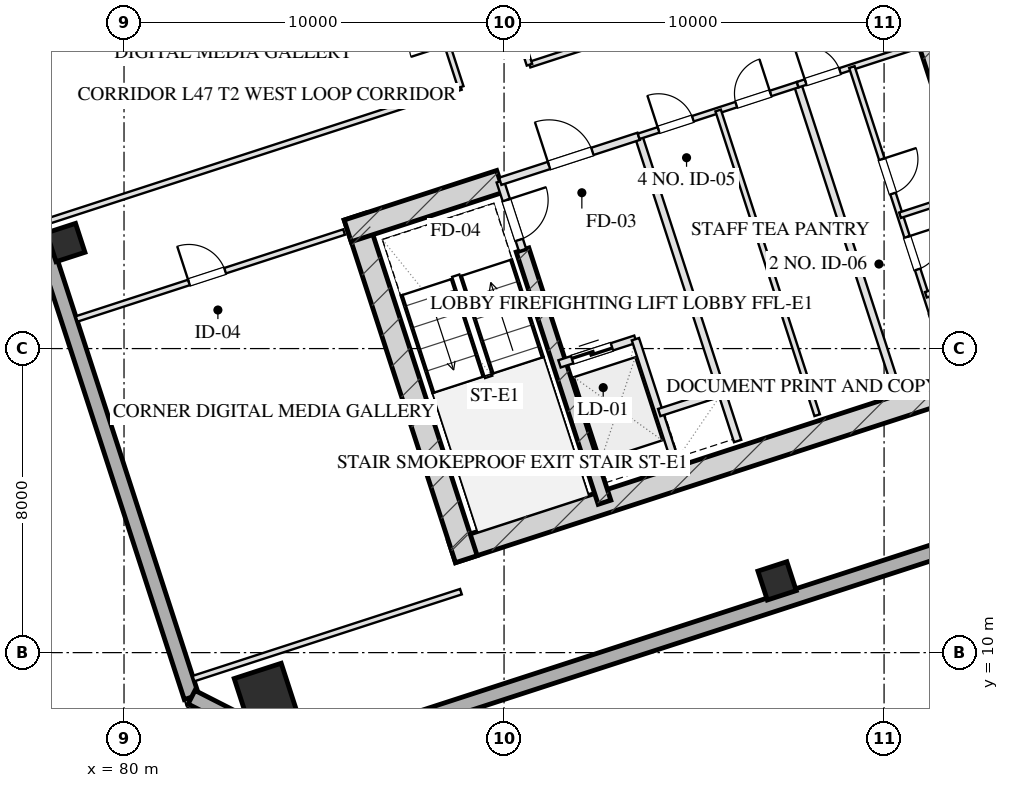
"""IFC4 building model, lengths in metres.
Left out: names, types, materials, properties, quantities, classifications, styles, units other than length and angle.
Written with IfcOpenShell. Run it as: python <this file> out.ifc"""

import sys

from ifc_helpers import new_model, si_unit, direction, frame, frame_2d, origin, origin_2d, place, context, subcontext, project, spatial, rectangle, hollow_rectangle, extrude, element, fill, save


model = new_model("IFC4")
c1 = context("Model", 3, precision=1e-05, world=origin(), true_north=direction((0.0, 1.0)))
c2 = subcontext(c1, "Body", "Model", "MODEL_VIEW")
j1 = project(units=[si_unit("LENGTHUNIT", "METRE"), si_unit("PLANEANGLEUNIT", "RADIAN")], contexts=[c1])
p1 = place(None, origin())
s1 = spatial("IfcSite", under=j1, at=p1, CompositionType="ELEMENT")
p2 = place(p1, origin())
s2 = spatial("IfcBuilding", under=s1, at=p2, CompositionType="ELEMENT")
p3 = place(p2, frame((0.0, 0.0, 177.1)))
s3 = spatial("IfcBuildingStorey", under=s2, at=p3, CompositionType="ELEMENT", Elevation=177.1)
p4 = place(p3, frame((88.63, 12.652, 0.0), z_axis=(0.0, 0.0, 1.0), x_axis=(0.95105714907, 0.309015046886, 0.0)))
e1 = element("IfcWall", 1, at=p4, inside=s3, PredefinedType="SHEAR", context=c2, shape_type="SweptSolid", body=[
    extrude(rectangle(XDim=16.4, YDim=0.6, at=frame_2d((8.2, 0.0))), origin(), (0.0, 0.0, 1.0), 3.45),
])
p5 = place(p3, frame((86.078, 21.475, 0.0), z_axis=(0.0, 0.0, 1.0), x_axis=(0.309017938678, -0.951056209472, 0.0)))
e2 = element("IfcWall", 2, at=p5, inside=s3, PredefinedType="SHEAR", context=c2, shape_type="SweptSolid", body=[
    extrude(rectangle(XDim=9.48, YDim=0.6, at=frame_2d((4.74, 0.0))), origin(), (0.0, 0.0, 1.0), 3.45),
])
p6 = place(p3, frame((101.105, 26.358, 0.0), z_axis=(0.0, 0.0, 1.0), x_axis=(0.309010370028, -0.95105866865, 0.0)))
e3 = element("IfcWall", 3, at=p6, inside=s3, PredefinedType="SHEAR", context=c2, shape_type="SweptSolid", body=[
    extrude(rectangle(XDim=9.48, YDim=0.6, at=frame_2d((4.74, 0.0))), origin(), (0.0, 0.0, 1.0), 3.45),
])
p7 = place(p3, frame((90.486, 20.594, 0.0), z_axis=(0.0, 0.0, 1.0), x_axis=(0.309020428229, -0.951055400562, 0.0)))
e4 = element("IfcWall", 4, at=p7, inside=s3, PredefinedType="SHEAR", context=c2, shape_type="SweptSolid", body=[
    extrude(rectangle(XDim=6.98, YDim=0.35, at=frame_2d((3.49, 0.0))), origin(), (0.0, 0.0, 1.0), 3.45),
])
p8 = place(p3, frame((85.886, 21.097, 0.0), z_axis=(0.0, 0.0, 1.0), x_axis=(0.951068073652, 0.308981422225, 0.0)))
e5 = element("IfcWall", 5, at=p8, inside=s3, PredefinedType="SHEAR", context=c2, shape_type="SweptSolid", body=[
    extrude(rectangle(XDim=4.22, YDim=0.6, at=frame_2d((2.11, 0.0))), origin(), (0.0, 0.0, 1.0), 3.45),
])
p9 = place(p3, frame((83.719, 8.901, 0.0), z_axis=(0.0, 0.0, 1.0), x_axis=(0.951056516295, 0.309016994375, 0.0)))
e6 = element("IfcColumn", 6, at=p9, inside=s3, PredefinedType="COLUMN", context=c2, shape_type="SweptSolid", body=[
    extrude(hollow_rectangle(XDim=1.3, YDim=1.3, WallThickness=0.045, at=origin_2d()), origin(), (0.0, 0.0, 1.0), 3.451),
])
for number, where, z_axis, x_axis in (
    (7, (78.468, 20.79, 0.0), (0.0, 0.0, 1.0), (0.951, 0.309, 0.0)),
    (8, (97.185, 11.888, 0.0), (0.0, 0.0, 1.0), (0.951, 0.309, 0.0)),
):
    element("IfcColumn", number, at=place(p3, frame(where, z_axis=z_axis, x_axis=x_axis)), inside=s3, PredefinedType="COLUMN", context=c2, shape_type="SweptSolid", body=[
        extrude(hollow_rectangle(XDim=0.8, YDim=0.8, WallThickness=0.028, at=origin_2d()), origin(), (0.0, 0.0, 1.0), 3.451),
    ])
p10 = place(p3, frame((81.776, 8.827, 0.0), z_axis=(0.0, 0.0, 1.0), x_axis=(-0.309014228706, 0.951057414911, 0.0)))
e9 = element("IfcWall", 9, at=p10, inside=s3, PredefinedType="SOLIDWALL", context=c2, shape_type="SweptSolid", body=[
    extrude(rectangle(XDim=42.8, YDim=0.4, at=frame_2d((21.4, 0.0))), origin(), (0.0, 0.0, 1.0), 2.61),
])
p11 = place(p10, frame((13.95, 0.0, 0.75)))
e10 = element("IfcOpeningElement", 10, at=p11, cuts=e9, PredefinedType="OPENING", context=c2, shape_type="SweptSolid", body=[
    extrude(rectangle(XDim=2.1, YDim=1.46, at=frame_2d((1.05, 0.73))), frame((0.0, 0.21, 0.0), z_axis=(0.0, -1.0, 0.0), x_axis=(1.0, 0.0, 0.0)), (0.0, 0.0, 1.0), 0.42),
])
p12 = place(p10, frame((17.75, 0.0, 0.75)))
e11 = element("IfcOpeningElement", 11, at=p12, cuts=e9, PredefinedType="OPENING", context=c2, shape_type="SweptSolid", body=[
    extrude(rectangle(XDim=2.1, YDim=1.46, at=frame_2d((1.05, 0.73))), frame((0.0, 0.21, 0.0), z_axis=(0.0, -1.0, 0.0), x_axis=(1.0, 0.0, 0.0)), (0.0, 0.0, 1.0), 0.42),
])
p13 = place(p10, frame((23.95, 0.0, 0.0)))
e12 = element("IfcOpeningElement", 12, at=p13, cuts=e9, PredefinedType="OPENING", context=c2, shape_type="SweptSolid", body=[
    extrude(rectangle(XDim=1.1, YDim=2.15, at=frame_2d((0.55, 1.075))), frame((0.0, 0.21, 0.0), z_axis=(0.0, -1.0, 0.0), x_axis=(1.0, 0.0, 0.0)), (0.0, 0.0, 1.0), 0.42),
])
p14 = place(p3, frame((98.224, 59.173, 0.0), z_axis=(0.0, 0.0, 1.0), x_axis=(0.309014228706, -0.951057414911, 0.0)))
e13 = element("IfcWall", 13, at=p14, inside=s3, PredefinedType="SOLIDWALL", context=c2, shape_type="SweptSolid", body=[
    extrude(rectangle(XDim=42.8, YDim=0.4, at=frame_2d((21.4, 0.0))), origin(), (0.0, 0.0, 1.0), 2.61),
])
p15 = place(p14, frame((26.75, 0.0, 0.75)))
e14 = element("IfcOpeningElement", 14, at=p15, cuts=e13, PredefinedType="OPENING", context=c2, shape_type="SweptSolid", body=[
    extrude(rectangle(XDim=2.1, YDim=1.46, at=frame_2d((1.05, 0.73))), frame((0.0, 0.21, 0.0), z_axis=(0.0, -1.0, 0.0), x_axis=(1.0, 0.0, 0.0)), (0.0, 0.0, 1.0), 0.42),
])
p16 = place(p14, frame((22.95, 0.0, 0.75)))
e15 = element("IfcOpeningElement", 15, at=p16, cuts=e13, PredefinedType="OPENING", context=c2, shape_type="SweptSolid", body=[
    extrude(rectangle(XDim=2.1, YDim=1.46, at=frame_2d((1.05, 0.73))), frame((0.0, 0.21, 0.0), z_axis=(0.0, -1.0, 0.0), x_axis=(1.0, 0.0, 0.0)), (0.0, 0.0, 1.0), 0.42),
])
p17 = place(p14, frame((16.45, 0.0, 0.0)))
e16 = element("IfcOpeningElement", 16, at=p17, cuts=e13, PredefinedType="OPENING", context=c2, shape_type="SweptSolid", body=[
    extrude(rectangle(XDim=1.1, YDim=2.15, at=frame_2d((0.55, 1.075))), frame((0.0, 0.21, 0.0), z_axis=(0.0, -1.0, 0.0), x_axis=(1.0, 0.0, 0.0)), (0.0, 0.0, 1.0), 0.42),
])
p18 = place(p3, frame((109.908, 15.444, 0.0), z_axis=(0.0, 0.0, 1.0), x_axis=(-0.951057580055, -0.30901372044, 0.0)))
e17 = element("IfcWall", 17, at=p18, inside=s3, PredefinedType="SOLIDWALL", context=c2, shape_type="SweptSolid", body=[
    extrude(rectangle(XDim=26.4, YDim=0.4, at=frame_2d((13.2, 0.0))), origin(), (0.0, 0.0, 1.0), 2.61),
])
p19 = place(p3, frame((84.801, 7.286, 0.0), z_axis=(0.0, 0.0, 1.0), x_axis=(-0.891020832027, 0.453962417932, 0.0)))
e18 = element("IfcWall", 18, at=p19, inside=s3, PredefinedType="SOLIDWALL", context=c2, shape_type="SweptSolid", body=[
    extrude(rectangle(XDim=3.394, YDim=0.4, at=frame_2d((1.697, 0.0))), origin(), (0.0, 0.0, 1.0), 2.61),
])
p20 = place(p3, frame((89.899, 22.401, 0.0), z_axis=(0.0, 0.0, 1.0), x_axis=(0.308932062672, -0.951084108086, 0.0)))
e19 = element("IfcWall", 19, at=p20, inside=s3, PredefinedType="PARTITIONING", context=c2, shape_type="SweptSolid", body=[
    extrude(rectangle(XDim=1.9, YDim=0.2, at=frame_2d((0.95, 0.0))), origin(), (0.0, 0.0, 1.0), 3.175),
])
p21 = place(p20, frame((0.52, 0.0, 0.0)))
e20 = element("IfcOpeningElement", 20, at=p21, cuts=e19, PredefinedType="OPENING", context=c2, shape_type="SweptSolid", body=[
    extrude(rectangle(XDim=1.1, YDim=2.05, at=frame_2d((0.55, 1.025))), frame((0.0, 0.11, 0.0), z_axis=(0.0, -1.0, 0.0), x_axis=(1.0, 0.0, 0.0)), (0.0, 0.0, 1.0), 0.22),
])
p22 = place(p3, frame((93.542, 23.585, 0.0), z_axis=(0.0, 0.0, 1.0), x_axis=(0.309042196757, -0.951048327176, 0.0)))
e21 = element("IfcWall", 21, at=p22, inside=s3, PredefinedType="PARTITIONING", context=c2, shape_type="SweptSolid", body=[
    extrude(rectangle(XDim=8.43, YDim=0.2, at=frame_2d((4.215, 0.0))), origin(), (0.0, 0.0, 1.0), 3.175),
])
p23 = place(p3, frame((89.899, 22.401, 0.0), z_axis=(0.0, 0.0, 1.0), x_axis=(0.951046716504, 0.309047153403, 0.0)))
e22 = element("IfcWall", 22, at=p23, inside=s3, PredefinedType="PARTITIONING", context=c2, shape_type="SweptSolid", body=[
    extrude(rectangle(XDim=3.83, YDim=0.2, at=frame_2d((1.915, 0.0))), origin(), (0.0, 0.0, 1.0), 3.175),
])
p24 = place(p23, frame((1.35, 0.0, 0.0)))
e23 = element("IfcOpeningElement", 23, at=p24, cuts=e22, PredefinedType="OPENING", context=c2, shape_type="SweptSolid", body=[
    extrude(rectangle(XDim=1.2, YDim=2.05, at=frame_2d((0.6, 1.025))), frame((0.0, 0.11, 0.0), z_axis=(0.0, -1.0, 0.0), x_axis=(1.0, 0.0, 0.0)), (0.0, 0.0, 1.0), 0.22),
])
p25 = place(p3, frame((91.46, 17.598, 0.0), z_axis=(0.0, 0.0, 1.0), x_axis=(0.951062257173, 0.308999325213, 0.0)))
e24 = element("IfcWall", 24, at=p25, inside=s3, PredefinedType="PARTITIONING", context=c2, shape_type="SweptSolid", body=[
    extrude(rectangle(XDim=2.1, YDim=0.2, at=frame_2d((1.05, 0.0))), origin(), (0.0, 0.0, 1.0), 3.175),
])
p26 = place(p25, frame((0.35, 0.0, 0.0)))
e25 = element("IfcOpeningElement", 25, at=p26, cuts=e24, PredefinedType="OPENING", context=c2, shape_type="SweptSolid", body=[
    extrude(rectangle(XDim=1.1, YDim=2.05, at=frame_2d((0.55, 1.025))), frame((0.0, 0.11, 0.0), z_axis=(0.0, -1.0, 0.0), x_axis=(1.0, 0.0, 0.0)), (0.0, 0.0, 1.0), 0.22),
])
p27 = place(p3, frame((93.457, 18.247, 0.0), z_axis=(0.0, 0.0, 1.0), x_axis=(0.3089935693, -0.951064127245, 0.0)))
e26 = element("IfcWall", 26, at=p27, inside=s3, PredefinedType="PARTITIONING", context=c2, shape_type="SweptSolid", body=[
    extrude(rectangle(XDim=3.7, YDim=0.2, at=frame_2d((1.85, 0.0))), origin(), (0.0, 0.0, 1.0), 3.175),
])
p28 = place(p3, frame((94.084, 16.317, 0.0), z_axis=(0.0, 0.0, 1.0), x_axis=(0.951041328149, 0.309063734775, 0.0)))
e27 = element("IfcWall", 27, at=p28, inside=s3, PredefinedType="PARTITIONING", context=c2, shape_type="SweptSolid", body=[
    extrude(rectangle(XDim=1.73, YDim=0.2, at=frame_2d((0.865, 0.0))), origin(), (0.0, 0.0, 1.0), 3.175),
])
p29 = place(p3, frame((97.727, 24.944, 0.0), z_axis=(0.0, 0.0, 1.0), x_axis=(0.309016001439, -0.951056838919, 0.0)))
e28 = element("IfcWall", 28, at=p29, inside=s3, PredefinedType="PARTITIONING", context=c2, shape_type="SweptSolid", body=[
    extrude(rectangle(XDim=8.43, YDim=0.2, at=frame_2d((4.215, 0.0))), origin(), (0.0, 0.0, 1.0), 3.175),
])
p30 = place(p3, frame((93.542, 23.585, 0.0), z_axis=(0.0, 0.0, 1.0), x_axis=(0.951063829732, 0.308994485023, 0.0)))
e29 = element("IfcWall", 29, at=p30, inside=s3, PredefinedType="PARTITIONING", context=c2, shape_type="SweptSolid", body=[
    extrude(rectangle(XDim=4.4, YDim=0.15, at=frame_2d((2.2, 0.0))), origin(), (0.0, 0.0, 1.0), 3.175),
])
p31 = place(p30, frame((0.55, 0.0, 0.0)))
e30 = element("IfcOpeningElement", 30, at=p31, cuts=e29, PredefinedType="OPENING", context=c2, shape_type="SweptSolid", body=[
    extrude(rectangle(XDim=0.95, YDim=2.05, at=frame_2d((0.475, 1.025))), frame((0.0, 0.085, 0.0), z_axis=(0.0, -1.0, 0.0), x_axis=(1.0, 0.0, 0.0)), (0.0, 0.0, 1.0), 0.17),
])
p32 = place(p30, frame((2.7, 0.0, 0.0)))
e31 = element("IfcOpeningElement", 31, at=p32, cuts=e29, PredefinedType="OPENING", context=c2, shape_type="SweptSolid", body=[
    extrude(rectangle(XDim=0.95, YDim=2.05, at=frame_2d((0.475, 1.025))), frame((0.0, 0.085, 0.0), z_axis=(0.0, -1.0, 0.0), x_axis=(1.0, 0.0, 0.0)), (0.0, 0.0, 1.0), 0.17),
])
p33 = place(p3, frame((95.634, 24.265, 0.0), z_axis=(0.0, 0.0, 1.0), x_axis=(0.309007490203, -0.951059604335, 0.0)))
e32 = element("IfcWall", 32, at=p33, inside=s3, PredefinedType="PARTITIONING", context=c2, shape_type="SweptSolid", body=[
    extrude(rectangle(XDim=8.43, YDim=0.15, at=frame_2d((4.215, 0.0))), origin(), (0.0, 0.0, 1.0), 3.175),
])
p34 = place(p3, frame((97.727, 24.944, 0.0), z_axis=(0.0, 0.0, 1.0), x_axis=(0.951036872128, 0.309077446369, 0.0)))
e33 = element("IfcWall", 33, at=p34, inside=s3, PredefinedType="PARTITIONING", context=c2, shape_type="SweptSolid", body=[
    extrude(rectangle(XDim=3.2, YDim=0.15, at=frame_2d((1.6, 0.0))), origin(), (0.0, 0.0, 1.0), 3.175),
])
p35 = place(p34, frame((0.22, 0.0, 0.0)))
e34 = element("IfcOpeningElement", 34, at=p35, cuts=e33, PredefinedType="OPENING", context=c2, shape_type="SweptSolid", body=[
    extrude(rectangle(XDim=0.95, YDim=2.05, at=frame_2d((0.475, 1.025))), frame((0.0, 0.085, 0.0), z_axis=(0.0, -1.0, 0.0), x_axis=(1.0, 0.0, 0.0)), (0.0, 0.0, 1.0), 0.17),
])
p36 = place(p3, frame((99.153, 25.408, 0.0), z_axis=(0.0, 0.0, 1.0), x_axis=(0.309016001439, -0.951056838919, 0.0)))
e35 = element("IfcWall", 35, at=p36, inside=s3, PredefinedType="PARTITIONING", context=c2, shape_type="SweptSolid", body=[
    extrude(rectangle(XDim=8.43, YDim=0.15, at=frame_2d((4.215, 0.0))), origin(), (0.0, 0.0, 1.0), 3.175),
])
p37 = place(p36, frame((2.55, 0.0, 0.0)))
e36 = element("IfcOpeningElement", 36, at=p37, cuts=e35, PredefinedType="OPENING", context=c2, shape_type="SweptSolid", body=[
    extrude(rectangle(XDim=0.95, YDim=2.05, at=frame_2d((0.475, 1.025))), frame((0.0, 0.085, 0.0), z_axis=(0.0, -1.0, 0.0), x_axis=(1.0, 0.0, 0.0)), (0.0, 0.0, 1.0), 0.17),
])
p38 = place(p36, frame((4.7, 0.0, 0.0)))
e37 = element("IfcOpeningElement", 37, at=p38, cuts=e35, PredefinedType="OPENING", context=c2, shape_type="SweptSolid", body=[
    extrude(rectangle(XDim=0.9, YDim=2.05, at=frame_2d((0.45, 1.025))), frame((0.0, 0.085, 0.0), z_axis=(0.0, -1.0, 0.0), x_axis=(1.0, 0.0, 0.0)), (0.0, 0.0, 1.0), 0.17),
])
p39 = place(p36, frame((6.8, 0.0, 0.0)))
e38 = element("IfcOpeningElement", 38, at=p39, cuts=e35, PredefinedType="OPENING", context=c2, shape_type="SweptSolid", body=[
    extrude(rectangle(XDim=0.9, YDim=2.05, at=frame_2d((0.45, 1.025))), frame((0.0, 0.085, 0.0), z_axis=(0.0, -1.0, 0.0), x_axis=(1.0, 0.0, 0.0)), (0.0, 0.0, 1.0), 0.17),
])
p40 = place(p3, frame((100.42, 21.509, 0.0), z_axis=(0.0, 0.0, 1.0), x_axis=(0.951040401051, 0.309066587596, 0.0)))
e39 = element("IfcWall", 39, at=p40, inside=s3, PredefinedType="PARTITIONING", context=c2, shape_type="SweptSolid", body=[
    extrude(rectangle(XDim=1.7, YDim=0.15, at=frame_2d((0.85, 0.0))), origin(), (0.0, 0.0, 1.0), 3.175),
])
p41 = place(p3, frame((101.1, 19.416, 0.0), z_axis=(0.0, 0.0, 1.0), x_axis=(0.951054116971, 0.309024378638, 0.0)))
e40 = element("IfcWall", 40, at=p41, inside=s3, PredefinedType="PARTITIONING", context=c2, shape_type="SweptSolid", body=[
    extrude(rectangle(XDim=1.7, YDim=0.15, at=frame_2d((0.85, 0.0))), origin(), (0.0, 0.0, 1.0), 3.175),
])
p42 = place(p3, frame((81.828, 9.316, 0.0), z_axis=(0.0, 0.0, 1.0), x_axis=(0.95105128112, 0.309033106124, 0.0)))
e41 = element("IfcWall", 41, at=p42, inside=s3, PredefinedType="PARTITIONING", context=c2, shape_type="SweptSolid", body=[
    extrude(rectangle(XDim=7.4, YDim=0.15, at=frame_2d((3.7, 0.0))), origin(), (0.0, 0.0, 1.0), 3.175),
])
p43 = place(p3, frame((78.753, 18.78, 0.0), z_axis=(0.0, 0.0, 1.0), x_axis=(0.951060977215, 0.309003264738, 0.0)))
e42 = element("IfcWall", 42, at=p43, inside=s3, PredefinedType="PARTITIONING", context=c2, shape_type="SweptSolid", body=[
    extrude(rectangle(XDim=7.4, YDim=0.15, at=frame_2d((3.7, 0.0))), origin(), (0.0, 0.0, 1.0), 3.175),
])
p44 = place(p43, frame((3.108, 0.0, 0.0)))
e43 = element("IfcOpeningElement", 43, at=p44, cuts=e42, PredefinedType="OPENING", context=c2, shape_type="SweptSolid", body=[
    extrude(rectangle(XDim=1.0, YDim=2.05, at=frame_2d((0.5, 1.025))), frame((0.0, 0.085, 0.0), z_axis=(0.0, -1.0, 0.0), x_axis=(1.0, 0.0, 0.0)), (0.0, 0.0, 1.0), 0.17),
])
p45 = place(p3, frame((77.925, 21.328, 0.0), z_axis=(0.0, 0.0, 1.0), x_axis=(0.951054972381, 0.309021746015, 0.0)))
e44 = element("IfcWall", 44, at=p45, inside=s3, PredefinedType="PARTITIONING", context=c2, shape_type="SweptSolid", body=[
    extrude(rectangle(XDim=11.5, YDim=0.15, at=frame_2d((5.75, 0.0))), origin(), (0.0, 0.0, 1.0), 3.175),
])
p46 = place(p3, frame((90.669, 25.469, 0.0), z_axis=(0.0, 0.0, 1.0), x_axis=(0.95106136293, 0.309002077568, 0.0)))
e45 = element("IfcWall", 45, at=p46, inside=s3, PredefinedType="PARTITIONING", context=c2, shape_type="SweptSolid", body=[
    extrude(rectangle(XDim=8.15, YDim=0.15, at=frame_2d((4.075, 0.0))), origin(), (0.0, 0.0, 1.0), 3.175),
])
p47 = place(p3, frame((88.862, 24.882, 0.0), z_axis=(0.0, 0.0, 1.0), x_axis=(-0.309008771245, 0.951059188113, 0.0)))
e46 = element("IfcWall", 46, at=p47, inside=s3, PredefinedType="PARTITIONING", context=c2, shape_type="SweptSolid", body=[
    extrude(rectangle(XDim=16.64, YDim=0.15, at=frame_2d((8.32, 0.0))), origin(), (0.0, 0.0, 1.0), 3.175),
])
p48 = place(p47, frame((1.16, 0.0, 0.0)))
e47 = element("IfcOpeningElement", 47, at=p48, cuts=e46, PredefinedType="OPENING", context=c2, shape_type="SweptSolid", body=[
    extrude(rectangle(XDim=1.0, YDim=2.05, at=frame_2d((0.5, 1.025))), frame((0.0, 0.085, 0.0), z_axis=(0.0, -1.0, 0.0), x_axis=(1.0, 0.0, 0.0)), (0.0, 0.0, 1.0), 0.17),
])
p49 = place(p47, frame((5.48, 0.0, 0.0)))
e48 = element("IfcOpeningElement", 48, at=p49, cuts=e46, PredefinedType="OPENING", context=c2, shape_type="SweptSolid", body=[
    extrude(rectangle(XDim=1.05, YDim=2.05, at=frame_2d((0.525, 1.025))), frame((0.0, 0.085, 0.0), z_axis=(0.0, -1.0, 0.0), x_axis=(1.0, 0.0, 0.0)), (0.0, 0.0, 1.0), 0.17),
])
p50 = place(p47, frame((8.08, 0.0, 0.0)))
e49 = element("IfcOpeningElement", 49, at=p50, cuts=e46, PredefinedType="OPENING", context=c2, shape_type="SweptSolid", body=[
    extrude(rectangle(XDim=1.0, YDim=2.05, at=frame_2d((0.5, 1.025))), frame((0.0, 0.085, 0.0), z_axis=(0.0, -1.0, 0.0), x_axis=(1.0, 0.0, 0.0)), (0.0, 0.0, 1.0), 0.17),
])
p51 = place(p47, frame((10.92, 0.0, 0.0)))
e50 = element("IfcOpeningElement", 50, at=p51, cuts=e46, PredefinedType="OPENING", context=c2, shape_type="SweptSolid", body=[
    extrude(rectangle(XDim=1.0, YDim=2.05, at=frame_2d((0.5, 1.025))), frame((0.0, 0.085, 0.0), z_axis=(0.0, -1.0, 0.0), x_axis=(1.0, 0.0, 0.0)), (0.0, 0.0, 1.0), 0.17),
])
p52 = place(p47, frame((14.48, 0.0, 0.0)))
e51 = element("IfcOpeningElement", 51, at=p52, cuts=e46, PredefinedType="OPENING", context=c2, shape_type="SweptSolid", body=[
    extrude(rectangle(XDim=1.0, YDim=2.05, at=frame_2d((0.5, 1.025))), frame((0.0, 0.085, 0.0), z_axis=(0.0, -1.0, 0.0), x_axis=(1.0, 0.0, 0.0)), (0.0, 0.0, 1.0), 0.17),
])
p53 = place(p3, frame((90.669, 25.469, 0.0), z_axis=(0.0, 0.0, 1.0), x_axis=(-0.309022042254, 0.951054876125, 0.0)))
e52 = element("IfcWall", 52, at=p53, inside=s3, PredefinedType="PARTITIONING", context=c2, shape_type="SweptSolid", body=[
    extrude(rectangle(XDim=16.64, YDim=0.15, at=frame_2d((8.32, 0.0))), origin(), (0.0, 0.0, 1.0), 3.175),
])
p54 = place(p53, frame((1.944, 0.0, 0.0)))
e53 = element("IfcOpeningElement", 53, at=p54, cuts=e52, PredefinedType="OPENING", context=c2, shape_type="SweptSolid", body=[
    extrude(rectangle(XDim=1.1, YDim=2.05, at=frame_2d((0.55, 1.025))), frame((0.0, 0.085, 0.0), z_axis=(0.0, -1.0, 0.0), x_axis=(1.0, 0.0, 0.0)), (0.0, 0.0, 1.0), 0.17),
])
p55 = place(p53, frame((14.264, 0.0, 0.0)))
e54 = element("IfcOpeningElement", 54, at=p55, cuts=e52, PredefinedType="OPENING", context=c2, shape_type="SweptSolid", body=[
    extrude(rectangle(XDim=1.1, YDim=2.05, at=frame_2d((0.55, 1.025))), frame((0.0, 0.085, 0.0), z_axis=(0.0, -1.0, 0.0), x_axis=(1.0, 0.0, 0.0)), (0.0, 0.0, 1.0), 0.17),
])
p56 = place(p3, frame((76.59, 25.437, 0.0), z_axis=(0.0, 0.0, 1.0), x_axis=(0.951054972381, 0.309021746015, 0.0)))
e55 = element("IfcWall", 55, at=p56, inside=s3, PredefinedType="PARTITIONING", context=c2, shape_type="SweptSolid", body=[
    extrude(rectangle(XDim=11.5, YDim=0.15, at=frame_2d((5.75, 0.0))), origin(), (0.0, 0.0, 1.0), 3.175),
])
p57 = place(p21, origin())
e56 = element("IfcDoor", 56, at=p57, inside=s3, OperationType="SINGLE_SWING_LEFT", PredefinedType="DOOR", context=c2, shape_type="SweptSolid", body=[
    extrude(rectangle(XDim=1.1, YDim=2.05, at=frame_2d((0.55, 1.025))), frame((0.0, 0.025, 0.0), z_axis=(0.0, -1.0, 0.0), x_axis=(1.0, 0.0, 0.0)), (0.0, 0.0, 1.0), 0.05),
])
fill(e20, e56)
p58 = place(p24, origin())
e57 = element("IfcDoor", 57, at=p58, inside=s3, OperationType="SINGLE_SWING_LEFT", PredefinedType="DOOR", context=c2, shape_type="SweptSolid", body=[
    extrude(rectangle(XDim=1.2, YDim=2.05, at=frame_2d((0.6, 1.025))), frame((0.0, 0.025, 0.0), z_axis=(0.0, -1.0, 0.0), x_axis=(1.0, 0.0, 0.0)), (0.0, 0.0, 1.0), 0.05),
])
fill(e23, e57)
p59 = place(p26, origin())
e58 = element("IfcDoor", 58, at=p59, inside=s3, OperationType="DOUBLE_DOOR_SLIDING", PredefinedType="DOOR", context=c2, shape_type="SweptSolid", body=[
    extrude(rectangle(XDim=1.1, YDim=2.05, at=frame_2d((0.55, 1.025))), frame((0.0, 0.025, 0.0), z_axis=(0.0, -1.0, 0.0), x_axis=(1.0, 0.0, 0.0)), (0.0, 0.0, 1.0), 0.05),
])
fill(e25, e58)
p60 = place(p31, origin())
e59 = element("IfcDoor", 59, at=p60, inside=s3, OperationType="SINGLE_SWING_LEFT", PredefinedType="DOOR", context=c2, shape_type="SweptSolid", body=[
    extrude(rectangle(XDim=0.95, YDim=2.05, at=frame_2d((0.475, 1.025))), frame((0.0, 0.025, 0.0), z_axis=(0.0, -1.0, 0.0), x_axis=(1.0, 0.0, 0.0)), (0.0, 0.0, 1.0), 0.05),
])
fill(e30, e59)
p61 = place(p32, origin())
e60 = element("IfcDoor", 60, at=p61, inside=s3, OperationType="SINGLE_SWING_RIGHT", PredefinedType="DOOR", context=c2, shape_type="SweptSolid", body=[
    extrude(rectangle(XDim=0.95, YDim=2.05, at=frame_2d((0.475, 1.025))), frame((0.0, 0.025, 0.0), z_axis=(0.0, -1.0, 0.0), x_axis=(1.0, 0.0, 0.0)), (0.0, 0.0, 1.0), 0.05),
])
fill(e31, e60)
p62 = place(p35, origin())
e61 = element("IfcDoor", 61, at=p62, inside=s3, OperationType="SINGLE_SWING_LEFT", PredefinedType="DOOR", context=c2, shape_type="SweptSolid", body=[
    extrude(rectangle(XDim=0.95, YDim=2.05, at=frame_2d((0.475, 1.025))), frame((0.0, 0.025, 0.0), z_axis=(0.0, -1.0, 0.0), x_axis=(1.0, 0.0, 0.0)), (0.0, 0.0, 1.0), 0.05),
])
fill(e34, e61)
p63 = place(p37, origin())
e62 = element("IfcDoor", 62, at=p63, inside=s3, OperationType="SINGLE_SWING_LEFT", PredefinedType="DOOR", context=c2, shape_type="SweptSolid", body=[
    extrude(rectangle(XDim=0.95, YDim=2.05, at=frame_2d((0.475, 1.025))), frame((0.0, 0.025, 0.0), z_axis=(0.0, -1.0, 0.0), x_axis=(1.0, 0.0, 0.0)), (0.0, 0.0, 1.0), 0.05),
])
fill(e36, e62)
p64 = place(p38, origin())
e63 = element("IfcDoor", 63, at=p64, inside=s3, OperationType="SINGLE_SWING_LEFT", PredefinedType="DOOR", context=c2, shape_type="SweptSolid", body=[
    extrude(rectangle(XDim=0.9, YDim=2.05, at=frame_2d((0.45, 1.025))), frame((0.0, 0.025, 0.0), z_axis=(0.0, -1.0, 0.0), x_axis=(1.0, 0.0, 0.0)), (0.0, 0.0, 1.0), 0.05),
])
fill(e37, e63)
p65 = place(p44, origin())
e64 = element("IfcDoor", 64, at=p65, inside=s3, OperationType="SINGLE_SWING_LEFT", PredefinedType="DOOR", context=c2, shape_type="SweptSolid", body=[
    extrude(rectangle(XDim=1.0, YDim=2.05, at=frame_2d((0.5, 1.025))), frame((0.0, 0.025, 0.0), z_axis=(0.0, -1.0, 0.0), x_axis=(1.0, 0.0, 0.0)), (0.0, 0.0, 1.0), 0.05),
])
fill(e43, e64)
save(model, sys.argv[1])
